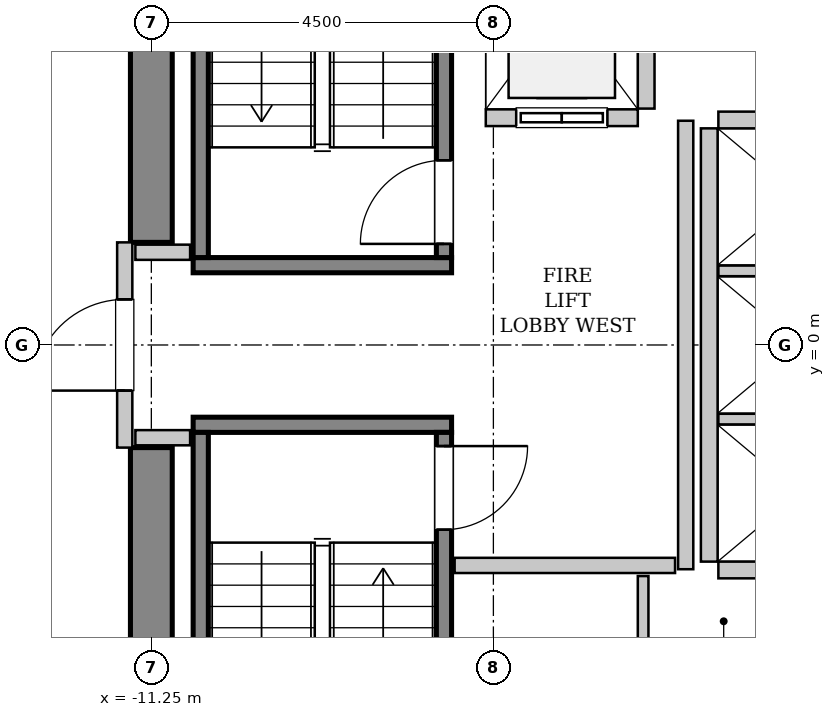
"""IFC4 building model, lengths in metres.
Left out: names, types, materials, properties, quantities, classifications, styles, units other than length and angle.
Written with IfcOpenShell. Run it as: python <this file> out.ifc"""

import sys

from ifc_helpers import new_model, si_unit, direction, frame, frame_2d, origin, place, context, subcontext, project, spatial, rectangle, extrude, source, transform, mapped, element, fill, save


model = new_model("IFC4")
c1 = context("Model", 3, precision=1e-05, world=origin(), true_north=direction((0.0, 1.0)))
c2 = subcontext(c1, "Body", "Model", "MODEL_VIEW")
j1 = project(units=[si_unit("LENGTHUNIT", "METRE"), si_unit("PLANEANGLEUNIT", "RADIAN")], contexts=[c1])
p1 = place(None, origin())
s1 = spatial("IfcSite", under=j1, at=p1, CompositionType="ELEMENT")
p2 = place(p1, origin())
s2 = spatial("IfcBuilding", under=s1, at=p2, CompositionType="ELEMENT")
p3 = place(p2, frame((0.0, 0.0, 160.2)))
s3 = spatial("IfcBuildingStorey", under=s2, at=p3, CompositionType="ELEMENT", Elevation=160.2)
m1 = source(origin(), c2, "Body", "SweptSolid", [
    extrude(rectangle(XDim=7.375, YDim=0.55, at=frame_2d((3.688, 0.0))), origin(), (0.0, 0.0, 1.0), 3.8),
])
for number, where, z_axis, x_axis in (
    (1, (-11.25, -8.725, 0.0), (0.0, 0.0, 1.0), (0.0, 1.0, 0.0)),
    (2, (-11.25, 1.35, 0.0), (0.0, 0.0, 1.0), (0.0, 1.0, 0.0)),
):
    element("IfcWall", number, at=place(p3, frame(where, z_axis=z_axis, x_axis=x_axis)), inside=s3, PredefinedType="SHEAR", context=c2, shape_type="MappedRepresentation", body=[
        mapped(m1, transform((0.0, 0.0, 0.0), x_axis=(1.0, 0.0, 0.0), y_axis=(0.0, 1.0, 0.0), z_axis=(0.0, 0.0, 1.0), scale=1.0)),
    ])
m2 = source(origin(), c2, "Body", "SweptSolid", [
    extrude(rectangle(XDim=3.4, YDim=0.2, at=frame_2d((1.7, 0.0))), origin(), (0.0, 0.0, 1.0), 3.8),
])
p4 = place(p3, frame((-7.3, 1.05, 0.0), z_axis=(0.0, 0.0, 1.0), x_axis=(-1.0, 0.0, 0.0)))
e3 = element("IfcWall", 3, at=p4, inside=s3, PredefinedType="SOLIDWALL", context=c2, shape_type="MappedRepresentation", body=[
    mapped(m2, transform((0.0, 0.0, 0.0), x_axis=(1.0, 0.0, 0.0), y_axis=(0.0, 1.0, 0.0), z_axis=(0.0, 0.0, 1.0), scale=1.0)),
])
m3 = source(origin(), c2, "Body", "SweptSolid", [
    extrude(rectangle(XDim=7.1, YDim=0.2, at=frame_2d((3.55, 0.0))), origin(), (0.0, 0.0, 1.0), 3.8),
])
p5 = place(p3, frame((-7.4, 1.15, 0.0), z_axis=(0.0, 0.0, 1.0), x_axis=(0.0, 1.0, 0.0)))
e4 = element("IfcWall", 4, at=p5, inside=s3, PredefinedType="SOLIDWALL", context=c2, shape_type="MappedRepresentation", body=[
    mapped(m3, transform((0.0, 0.0, 0.0), x_axis=(1.0, 0.0, 0.0), y_axis=(0.0, 1.0, 0.0), z_axis=(0.0, 0.0, 1.0), scale=1.0)),
])
p6 = place(p5, frame((0.18, 0.0, 0.0)))
e5 = element("IfcOpeningElement", 5, at=p6, cuts=e4, PredefinedType="OPENING", context=c2, shape_type="SweptSolid", body=[
    extrude(rectangle(XDim=1.1, YDim=2.15, at=frame_2d((0.55, 1.075))), frame((0.0, 0.11, 0.0), z_axis=(0.0, -1.0, 0.0), x_axis=(1.0, 0.0, 0.0)), (0.0, 0.0, 1.0), 0.22),
])
p7 = place(p3, frame((-10.6, 1.15, 0.0), z_axis=(0.0, 0.0, 1.0), x_axis=(0.0, 1.0, 0.0)))
e6 = element("IfcWall", 6, at=p7, inside=s3, PredefinedType="SOLIDWALL", context=c2, shape_type="MappedRepresentation", body=[
    mapped(m3, transform((0.0, 0.0, 0.0), x_axis=(1.0, 0.0, 0.0), y_axis=(0.0, 1.0, 0.0), z_axis=(0.0, 0.0, 1.0), scale=1.0)),
])
p8 = place(p3, frame((-10.7, -1.05, 0.0), z_axis=(0.0, 0.0, 1.0), x_axis=(1.0, 0.0, 0.0)))
e7 = element("IfcWall", 7, at=p8, inside=s3, PredefinedType="SOLIDWALL", context=c2, shape_type="MappedRepresentation", body=[
    mapped(m2, transform((0.0, 0.0, 0.0), x_axis=(1.0, 0.0, 0.0), y_axis=(0.0, 1.0, 0.0), z_axis=(0.0, 0.0, 1.0), scale=1.0)),
])
p9 = place(p3, frame((-10.6, -1.15, 0.0), z_axis=(0.0, 0.0, 1.0), x_axis=(0.0, -1.0, 0.0)))
e8 = element("IfcWall", 8, at=p9, inside=s3, PredefinedType="SOLIDWALL", context=c2, shape_type="MappedRepresentation", body=[
    mapped(m3, transform((0.0, 0.0, 0.0), x_axis=(1.0, 0.0, 0.0), y_axis=(0.0, 1.0, 0.0), z_axis=(0.0, 0.0, 1.0), scale=1.0)),
])
p10 = place(p3, frame((-7.4, -1.15, 0.0), z_axis=(0.0, 0.0, 1.0), x_axis=(0.0, -1.0, 0.0)))
e9 = element("IfcWall", 9, at=p10, inside=s3, PredefinedType="SOLIDWALL", context=c2, shape_type="MappedRepresentation", body=[
    mapped(m3, transform((0.0, 0.0, 0.0), x_axis=(1.0, 0.0, 0.0), y_axis=(0.0, 1.0, 0.0), z_axis=(0.0, 0.0, 1.0), scale=1.0)),
])
p11 = place(p10, frame((0.18, 0.0, 0.0)))
e10 = element("IfcOpeningElement", 10, at=p11, cuts=e9, PredefinedType="OPENING", context=c2, shape_type="SweptSolid", body=[
    extrude(rectangle(XDim=1.1, YDim=2.15, at=frame_2d((0.55, 1.075))), frame((0.0, 0.11, 0.0), z_axis=(0.0, -1.0, 0.0), x_axis=(1.0, 0.0, 0.0)), (0.0, 0.0, 1.0), 0.22),
])
m4 = source(origin(), c2, "Body", "SweptSolid", [
    extrude(rectangle(XDim=2.0, YDim=0.22, at=frame_2d((1.0, 0.0))), origin(), (0.0, 0.0, 1.0), 3.535),
])
p12 = place(p3, frame((-6.85, 2.99, 0.0), z_axis=(0.0, 0.0, 1.0), x_axis=(1.0, 0.0, 0.0)))
e11 = element("IfcWall", 11, at=p12, inside=s3, PredefinedType="SOLIDWALL", context=c2, shape_type="MappedRepresentation", body=[
    mapped(m4, transform((0.0, 0.0, 0.0), x_axis=(1.0, 0.0, 0.0), y_axis=(0.0, 1.0, 0.0), z_axis=(0.0, 0.0, 1.0), scale=1.0)),
])
p13 = place(p12, frame((0.4, 0.0, 0.0)))
e12 = element("IfcOpeningElement", 12, at=p13, cuts=e11, PredefinedType="OPENING", context=c2, shape_type="SweptSolid", body=[
    extrude(rectangle(XDim=1.2, YDim=2.2, at=frame_2d((0.6, 1.1))), frame((0.0, 0.12, 0.0), z_axis=(0.0, -1.0, 0.0), x_axis=(1.0, 0.0, 0.0)), (0.0, 0.0, 1.0), 0.24),
])
m5 = source(origin(), c2, "Body", "SweptSolid", [
    extrude(rectangle(XDim=2.68, YDim=0.22, at=frame_2d((1.34, 0.0))), origin(), (0.0, 0.0, 1.0), 3.535),
])
p14 = place(p3, frame((-4.74, 3.11, 0.0), z_axis=(0.0, 0.0, 1.0), x_axis=(0.0, 1.0, 0.0)))
e13 = element("IfcWall", 13, at=p14, inside=s3, PredefinedType="SOLIDWALL", context=c2, shape_type="MappedRepresentation", body=[
    mapped(m5, transform((0.0, 0.0, 0.0), x_axis=(1.0, 0.0, 0.0), y_axis=(0.0, 1.0, 0.0), z_axis=(0.0, 0.0, 1.0), scale=1.0)),
])
m6 = source(origin(), c2, "Body", "SweptSolid", [
    extrude(rectangle(XDim=5.7, YDim=0.22, at=frame_2d((2.85, 0.0))), origin(), (0.0, 0.0, 1.0), 3.535),
])
p15 = place(p3, frame((-3.91, 2.85, 0.0), z_axis=(0.0, 0.0, 1.0), x_axis=(0.0, -1.0, 0.0)))
e14 = element("IfcWall", 14, at=p15, inside=s3, PredefinedType="SOLIDWALL", context=c2, shape_type="MappedRepresentation", body=[
    mapped(m6, transform((0.0, 0.0, 0.0), x_axis=(1.0, 0.0, 0.0), y_axis=(0.0, 1.0, 0.0), z_axis=(0.0, 0.0, 1.0), scale=1.0)),
])
m7 = source(origin(), c2, "Body", "SweptSolid", [
    extrude(rectangle(XDim=2.13, YDim=0.22, at=frame_2d((1.065, 0.0))), origin(), (0.0, 0.0, 1.0), 3.535),
])
p16 = place(p3, frame((-3.79, -2.96, 0.0), z_axis=(0.0, 0.0, 1.0), x_axis=(1.0, 0.0, 0.0)))
e15 = element("IfcWall", 15, at=p16, inside=s3, PredefinedType="SOLIDWALL", context=c2, shape_type="MappedRepresentation", body=[
    mapped(m7, transform((0.0, 0.0, 0.0), x_axis=(1.0, 0.0, 0.0), y_axis=(0.0, 1.0, 0.0), z_axis=(0.0, 0.0, 1.0), scale=1.0)),
])
m8 = source(origin(), c2, "Body", "SweptSolid", [
    extrude(rectangle(XDim=2.13, YDim=0.14, at=frame_2d((1.065, 0.0))), origin(), (0.0, 0.0, 1.0), 3.535),
])
for number, where, z_axis, x_axis in (
    (16, (-3.79, -0.975, 0.0), (0.0, 0.0, 1.0), (1.0, 0.0, 0.0)),
    (17, (-3.79, 0.975, 0.0), (0.0, 0.0, 1.0), (1.0, 0.0, 0.0)),
):
    element("IfcWall", number, at=place(p3, frame(where, z_axis=z_axis, x_axis=x_axis)), inside=s3, PredefinedType="PARTITIONING", context=c2, shape_type="MappedRepresentation", body=[
        mapped(m8, transform((0.0, 0.0, 0.0), x_axis=(1.0, 0.0, 0.0), y_axis=(0.0, 1.0, 0.0), z_axis=(0.0, 0.0, 1.0), scale=1.0)),
    ])
p17 = place(p3, frame((-1.66, 2.96, 0.0), z_axis=(0.0, 0.0, 1.0), x_axis=(-1.0, 0.0, 0.0)))
e18 = element("IfcWall", 18, at=p17, inside=s3, PredefinedType="SOLIDWALL", context=c2, shape_type="MappedRepresentation", body=[
    mapped(m7, transform((0.0, 0.0, 0.0), x_axis=(1.0, 0.0, 0.0), y_axis=(0.0, 1.0, 0.0), z_axis=(0.0, 0.0, 1.0), scale=1.0)),
])
m9 = source(origin(), c2, "Body", "SweptSolid", [
    extrude(rectangle(XDim=2.7, YDim=0.2, at=frame_2d((1.35, 0.0))), origin(), (0.0, 0.0, 1.0), 2.425),
])
p18 = place(p3, frame((-11.6, -1.35, 0.0), z_axis=(0.0, 0.0, 1.0), x_axis=(0.0, 1.0, 0.0)))
e19 = element("IfcWall", 19, at=p18, inside=s3, PredefinedType="PARTITIONING", context=c2, shape_type="MappedRepresentation", body=[
    mapped(m9, transform((0.0, 0.0, 0.0), x_axis=(1.0, 0.0, 0.0), y_axis=(0.0, 1.0, 0.0), z_axis=(0.0, 0.0, 1.0), scale=1.0)),
])
p19 = place(p18, frame((0.75, 0.0, 0.0)))
e20 = element("IfcOpeningElement", 20, at=p19, cuts=e19, PredefinedType="OPENING", context=c2, shape_type="SweptSolid", body=[
    extrude(rectangle(XDim=1.2, YDim=2.15, at=frame_2d((0.6, 1.075))), frame((0.0, 0.11, 0.0), z_axis=(0.0, -1.0, 0.0), x_axis=(1.0, 0.0, 0.0)), (0.0, 0.0, 1.0), 0.22),
])
m10 = source(origin(), c2, "Body", "SweptSolid", [
    extrude(rectangle(XDim=5.9, YDim=0.2, at=frame_2d((2.95, 0.0))), origin(), (0.0, 0.0, 1.0), 3.535),
])
p20 = place(p3, frame((-4.22, -2.95, 0.0), z_axis=(0.0, 0.0, 1.0), x_axis=(0.0, 1.0, 0.0)))
e21 = element("IfcWall", 21, at=p20, inside=s3, PredefinedType="PARTITIONING", context=c2, shape_type="MappedRepresentation", body=[
    mapped(m10, transform((0.0, 0.0, 0.0), x_axis=(1.0, 0.0, 0.0), y_axis=(0.0, 1.0, 0.0), z_axis=(0.0, 0.0, 1.0), scale=1.0)),
])
m11 = source(origin(), c2, "Body", "SweptSolid", [
    extrude(rectangle(XDim=2.9, YDim=0.2, at=frame_2d((1.45, 0.0))), origin(), (0.0, 0.0, 1.0), 3.535),
])
p21 = place(p3, frame((-7.26, -2.9, 0.0), z_axis=(0.0, 0.0, 1.0), x_axis=(1.0, 0.0, 0.0)))
e22 = element("IfcWall", 22, at=p21, inside=s3, PredefinedType="PARTITIONING", context=c2, shape_type="MappedRepresentation", body=[
    mapped(m11, transform((0.0, 0.0, 0.0), x_axis=(1.0, 0.0, 0.0), y_axis=(0.0, 1.0, 0.0), z_axis=(0.0, 0.0, 1.0), scale=1.0)),
])
m12 = source(origin(), c2, "Body", "SweptSolid", [
    extrude(rectangle(XDim=0.72, YDim=0.2, at=frame_2d((0.36, 0.0))), origin(), (0.0, 0.0, 1.0), 3.535),
])
for number, where, z_axis, x_axis in (
    (23, (-11.46, 1.22, 0.0), (0.0, 0.0, 1.0), (1.0, 0.0, 0.0)),
    (24, (-11.46, -1.22, 0.0), (0.0, 0.0, 1.0), (1.0, 0.0, 0.0)),
):
    element("IfcWall", number, at=place(p3, frame(where, z_axis=z_axis, x_axis=x_axis)), inside=s3, PredefinedType="PARTITIONING", context=c2, shape_type="MappedRepresentation", body=[
        mapped(m12, transform((0.0, 0.0, 0.0), x_axis=(1.0, 0.0, 0.0), y_axis=(0.0, 1.0, 0.0), z_axis=(0.0, 0.0, 1.0), scale=1.0)),
    ])
m13 = source(origin(), c2, "Body", "SweptSolid", [
    extrude(rectangle(XDim=1.1, YDim=0.14, at=frame_2d((0.55, 0.0))), origin(), (0.0, 0.0, 1.0), 3.535),
])
p22 = place(p3, frame((-4.78, -4.14, 0.0), z_axis=(0.0, 0.0, 1.0), x_axis=(0.0, 1.0, 0.0)))
e25 = element("IfcWall", 25, at=p22, inside=s3, PredefinedType="PARTITIONING", context=c2, shape_type="MappedRepresentation", body=[
    mapped(m13, transform((0.0, 0.0, 0.0), x_axis=(1.0, 0.0, 0.0), y_axis=(0.0, 1.0, 0.0), z_axis=(0.0, 0.0, 1.0), scale=1.0)),
])
m14 = source(origin(), c2, "Body", "SweptSolid", [
    extrude(rectangle(XDim=1.1, YDim=2.15, at=frame_2d((0.55, 1.075))), frame((0.0, 0.025, 0.0), z_axis=(0.0, -1.0, 0.0), x_axis=(1.0, 0.0, 0.0)), (0.0, 0.0, 1.0), 0.05),
])
p23 = place(p6, origin())
e26 = element("IfcDoor", 26, at=p23, inside=s3, OperationType="SINGLE_SWING_LEFT", PredefinedType="DOOR", context=c2, shape_type="MappedRepresentation", body=[
    mapped(m14, transform((0.0, 0.0, 0.0), x_axis=(1.0, 0.0, 0.0), y_axis=(0.0, 1.0, 0.0), z_axis=(0.0, 0.0, 1.0), scale=1.0)),
])
fill(e5, e26)
p24 = place(p11, origin())
e27 = element("IfcDoor", 27, at=p24, inside=s3, OperationType="SINGLE_SWING_LEFT", PredefinedType="DOOR", context=c2, shape_type="MappedRepresentation", body=[
    mapped(m14, transform((0.0, 0.0, 0.0), x_axis=(1.0, 0.0, 0.0), y_axis=(0.0, 1.0, 0.0), z_axis=(0.0, 0.0, 1.0), scale=1.0)),
])
fill(e10, e27)
m15 = source(origin(), c2, "Body", "SweptSolid", [
    extrude(rectangle(XDim=1.2, YDim=2.2, at=frame_2d((0.6, 1.1))), frame((0.0, 0.025, 0.0), z_axis=(0.0, -1.0, 0.0), x_axis=(1.0, 0.0, 0.0)), (0.0, 0.0, 1.0), 0.05),
])
p25 = place(p13, origin())
e28 = element("IfcDoor", 28, at=p25, inside=s3, OperationType="SLIDING_TO_LEFT", PredefinedType="DOOR", context=c2, shape_type="MappedRepresentation", body=[
    mapped(m15, transform((0.0, 0.0, 0.0), x_axis=(1.0, 0.0, 0.0), y_axis=(0.0, 1.0, 0.0), z_axis=(0.0, 0.0, 1.0), scale=1.0)),
])
fill(e12, e28)
m16 = source(origin(), c2, "Body", "SweptSolid", [
    extrude(rectangle(XDim=1.2, YDim=2.15, at=frame_2d((0.6, 1.075))), frame((0.0, 0.025, 0.0), z_axis=(0.0, -1.0, 0.0), x_axis=(1.0, 0.0, 0.0)), (0.0, 0.0, 1.0), 0.05),
])
p26 = place(p19, origin())
e29 = element("IfcDoor", 29, at=p26, inside=s3, OperationType="SINGLE_SWING_LEFT", PredefinedType="DOOR", context=c2, shape_type="MappedRepresentation", body=[
    mapped(m16, transform((0.0, 0.0, 0.0), x_axis=(1.0, 0.0, 0.0), y_axis=(0.0, 1.0, 0.0), z_axis=(0.0, 0.0, 1.0), scale=1.0)),
])
fill(e20, e29)
save(model, sys.argv[1])
